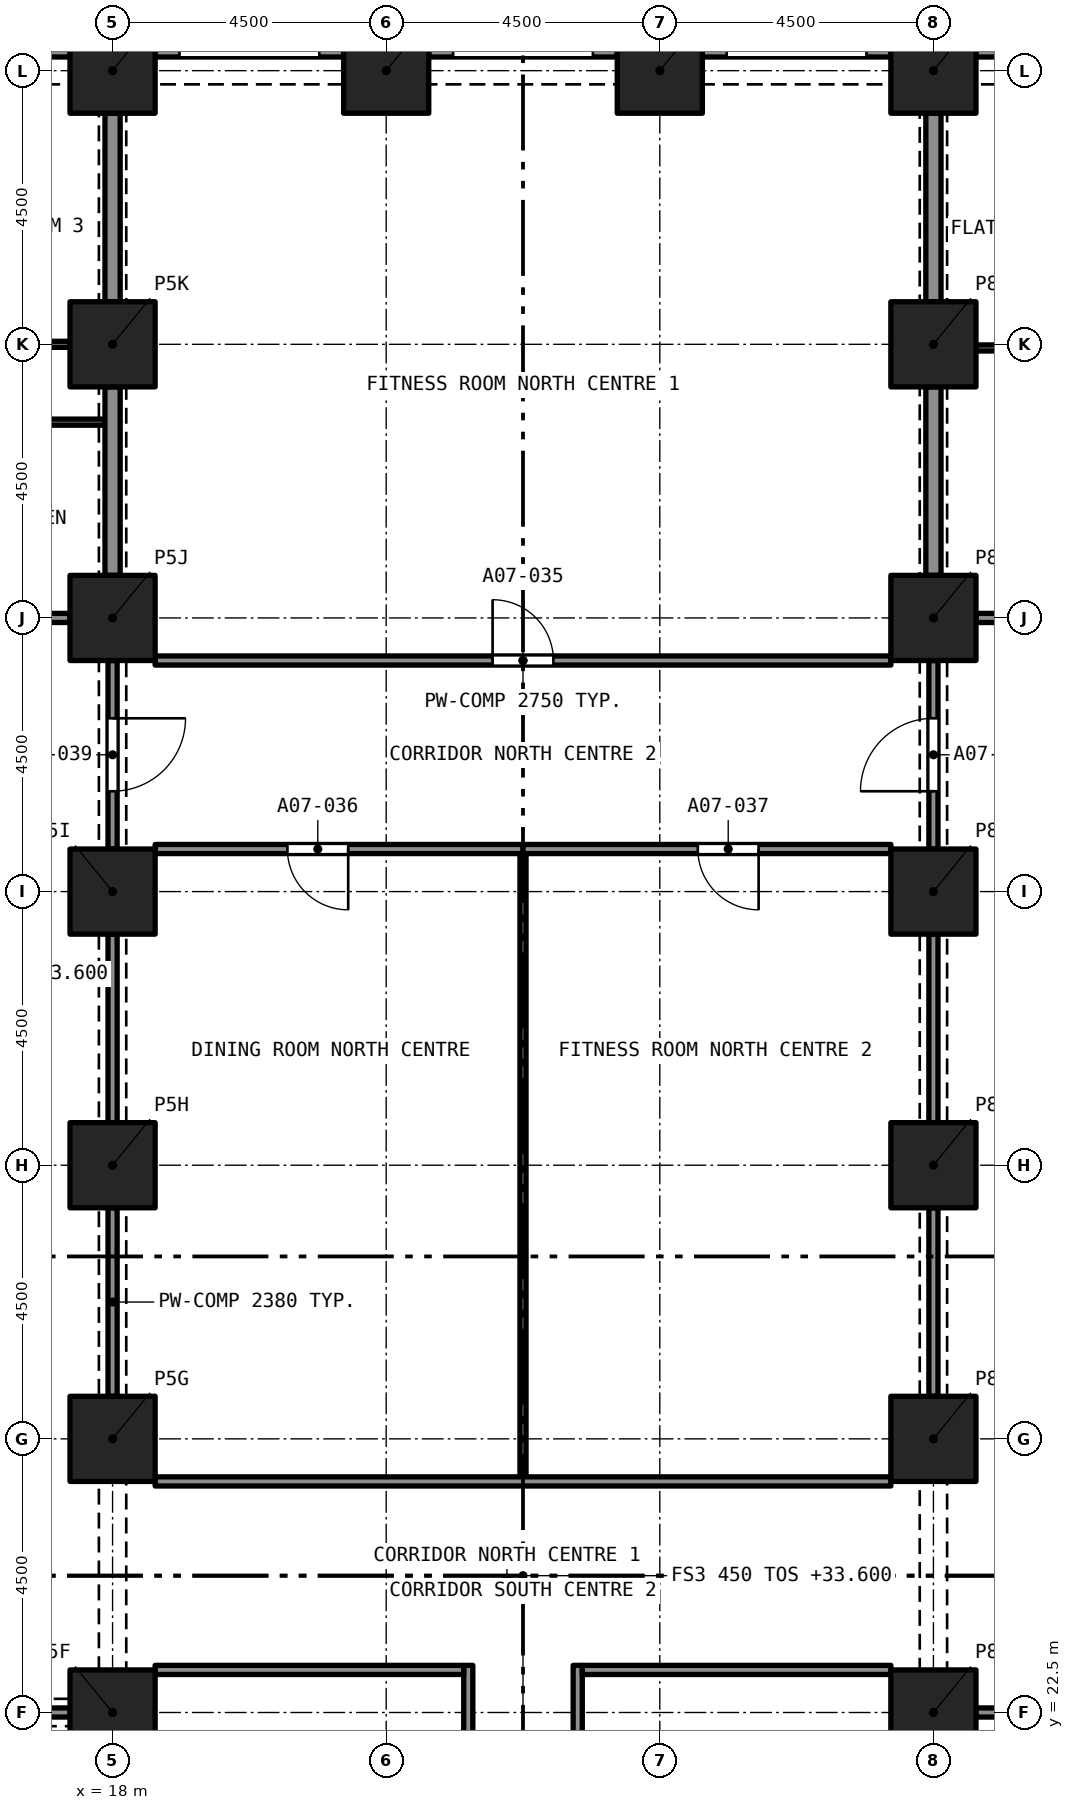
"""IFC4 building model, lengths in metres.
Left out: names, types, materials, properties, quantities, classifications, styles, units other than length and angle.
Written with IfcOpenShell. Run it as: python <this file> out.ifc"""

import sys

from ifc_helpers import new_model, si_unit, direction, frame, frame_2d, origin, origin_2d, place, context, subcontext, project, spatial, rectangle, extrude, element, fill, save


model = new_model("IFC4")
c1 = context("Model", 3, precision=1e-05, world=origin(), true_north=direction((0.0, 1.0)))
c2 = subcontext(c1, "Body", "Model", "MODEL_VIEW")
j1 = project(units=[si_unit("LENGTHUNIT", "METRE"), si_unit("PLANEANGLEUNIT", "RADIAN")], contexts=[c1])
p1 = place(None, origin())
s1 = spatial("IfcSite", under=j1, at=p1, CompositionType="ELEMENT")
p2 = place(p1, origin())
s2 = spatial("IfcBuilding", under=s1, at=p2, CompositionType="ELEMENT")
p3 = place(p2, frame((0.0, 0.0, 33.6)))
s3 = spatial("IfcBuildingStorey", under=s2, at=p3, CompositionType="ELEMENT", Elevation=33.6)
for number, where, z_axis, x_axis in (
    (1, (18.0, 22.5, 0.0), (0.0, 0.0, 1.0), (1.0, 0.0, 0.0)),
    (2, (31.5, 22.5, 0.0), (0.0, 0.0, 1.0), (1.0, 0.0, 0.0)),
    (3, (18.0, 27.0, 0.0), (0.0, 0.0, 1.0), (1.0, 0.0, 0.0)),
    (4, (31.5, 27.0, 0.0), (0.0, 0.0, 1.0), (1.0, 0.0, 0.0)),
    (5, (18.0, 31.5, 0.0), (0.0, 0.0, 1.0), (1.0, 0.0, 0.0)),
    (6, (31.5, 31.5, 0.0), (0.0, 0.0, 1.0), (1.0, 0.0, 0.0)),
    (7, (18.0, 36.0, 0.0), (0.0, 0.0, 1.0), (1.0, 0.0, 0.0)),
    (8, (31.5, 36.0, 0.0), (0.0, 0.0, 1.0), (1.0, 0.0, 0.0)),
    (9, (18.0, 40.5, 0.0), (0.0, 0.0, 1.0), (1.0, 0.0, 0.0)),
    (10, (31.5, 40.5, 0.0), (0.0, 0.0, 1.0), (1.0, 0.0, 0.0)),
    (11, (18.0, 45.0, 0.0), (0.0, 0.0, 1.0), (1.0, 0.0, 0.0)),
    (12, (31.5, 45.0, 0.0), (0.0, 0.0, 1.0), (1.0, 0.0, 0.0)),
    (13, (18.0, 49.5, 0.0), (0.0, 0.0, 1.0), (1.0, 0.0, 0.0)),
    (14, (22.5, 49.5, 0.0), (0.0, 0.0, 1.0), (1.0, 0.0, 0.0)),
    (15, (27.0, 49.5, 0.0), (0.0, 0.0, 1.0), (1.0, 0.0, 0.0)),
    (16, (31.5, 49.5, 0.0), (0.0, 0.0, 1.0), (1.0, 0.0, 0.0)),
):
    element("IfcColumn", number, at=place(p3, frame(where, z_axis=z_axis, x_axis=x_axis)), inside=s3, PredefinedType="COLUMN", context=c2, shape_type="SweptSolid", body=[
        extrude(rectangle(XDim=1.4, YDim=1.4, at=origin_2d()), origin(), (0.0, 0.0, 1.0), 3.2),
    ])
p4 = place(p3, frame((32.2, 49.875, 0.0), z_axis=(0.0, 0.0, 1.0), x_axis=(1.0, 0.0, 0.0)))
e17 = element("IfcWall", 17, at=p4, inside=s3, PredefinedType="SOLIDWALL", context=c2, shape_type="SweptSolid", body=[
    extrude(rectangle(XDim=3.1, YDim=0.3, at=frame_2d((1.55, 0.0))), origin(), (0.0, 0.0, 1.0), 3.2),
])
p5 = place(p4, frame((0.4, 0.0, 0.45)))
e18 = element("IfcOpeningElement", 18, at=p5, cuts=e17, PredefinedType="OPENING", context=c2, shape_type="SweptSolid", body=[
    extrude(rectangle(XDim=2.3, YDim=1.95, at=frame_2d((1.15, 0.975))), frame((0.0, 0.16, 0.0), z_axis=(0.0, -1.0, 0.0), x_axis=(1.0, 0.0, 0.0)), (0.0, 0.0, 1.0), 0.32),
])
p6 = place(p3, frame((27.7, 49.875, 0.0), z_axis=(0.0, 0.0, 1.0), x_axis=(1.0, 0.0, 0.0)))
e19 = element("IfcWall", 19, at=p6, inside=s3, PredefinedType="SOLIDWALL", context=c2, shape_type="SweptSolid", body=[
    extrude(rectangle(XDim=3.1, YDim=0.3, at=frame_2d((1.55, 0.0))), origin(), (0.0, 0.0, 1.0), 3.2),
])
p7 = place(p6, frame((0.4, 0.0, 0.45)))
e20 = element("IfcOpeningElement", 20, at=p7, cuts=e19, PredefinedType="OPENING", context=c2, shape_type="SweptSolid", body=[
    extrude(rectangle(XDim=2.3, YDim=1.95, at=frame_2d((1.15, 0.975))), frame((0.0, 0.16, 0.0), z_axis=(0.0, -1.0, 0.0), x_axis=(1.0, 0.0, 0.0)), (0.0, 0.0, 1.0), 0.32),
])
p8 = place(p3, frame((23.2, 49.875, 0.0), z_axis=(0.0, 0.0, 1.0), x_axis=(1.0, 0.0, 0.0)))
e21 = element("IfcWall", 21, at=p8, inside=s3, PredefinedType="SOLIDWALL", context=c2, shape_type="SweptSolid", body=[
    extrude(rectangle(XDim=3.1, YDim=0.3, at=frame_2d((1.55, 0.0))), origin(), (0.0, 0.0, 1.0), 3.2),
])
p9 = place(p8, frame((0.4, 0.0, 0.45)))
e22 = element("IfcOpeningElement", 22, at=p9, cuts=e21, PredefinedType="OPENING", context=c2, shape_type="SweptSolid", body=[
    extrude(rectangle(XDim=2.3, YDim=1.95, at=frame_2d((1.15, 0.975))), frame((0.0, 0.16, 0.0), z_axis=(0.0, -1.0, 0.0), x_axis=(1.0, 0.0, 0.0)), (0.0, 0.0, 1.0), 0.32),
])
p10 = place(p3, frame((18.7, 49.875, 0.0), z_axis=(0.0, 0.0, 1.0), x_axis=(1.0, 0.0, 0.0)))
e23 = element("IfcWall", 23, at=p10, inside=s3, PredefinedType="SOLIDWALL", context=c2, shape_type="SweptSolid", body=[
    extrude(rectangle(XDim=3.1, YDim=0.3, at=frame_2d((1.55, 0.0))), origin(), (0.0, 0.0, 1.0), 3.2),
])
p11 = place(p10, frame((0.4, 0.0, 0.45)))
e24 = element("IfcOpeningElement", 24, at=p11, cuts=e23, PredefinedType="OPENING", context=c2, shape_type="SweptSolid", body=[
    extrude(rectangle(XDim=2.3, YDim=1.95, at=frame_2d((1.15, 0.975))), frame((0.0, 0.16, 0.0), z_axis=(0.0, -1.0, 0.0), x_axis=(1.0, 0.0, 0.0)), (0.0, 0.0, 1.0), 0.32),
])
p12 = place(p3, frame((14.2, 49.875, 0.0), z_axis=(0.0, 0.0, 1.0), x_axis=(1.0, 0.0, 0.0)))
e25 = element("IfcWall", 25, at=p12, inside=s3, PredefinedType="SOLIDWALL", context=c2, shape_type="SweptSolid", body=[
    extrude(rectangle(XDim=3.1, YDim=0.3, at=frame_2d((1.55, 0.0))), origin(), (0.0, 0.0, 1.0), 3.2),
])
p13 = place(p12, frame((0.4, 0.0, 0.45)))
e26 = element("IfcOpeningElement", 26, at=p13, cuts=e25, PredefinedType="OPENING", context=c2, shape_type="SweptSolid", body=[
    extrude(rectangle(XDim=2.3, YDim=1.95, at=frame_2d((1.15, 0.975))), frame((0.0, 0.16, 0.0), z_axis=(0.0, -1.0, 0.0), x_axis=(1.0, 0.0, 0.0)), (0.0, 0.0, 1.0), 0.32),
])
p14 = place(p3, frame((13.5, 45.0, 0.0), z_axis=(0.0, 0.0, 1.0), x_axis=(1.0, 0.0, 0.0)))
e27 = element("IfcWall", 27, at=p14, inside=s3, PredefinedType="PARTITIONING", context=c2, shape_type="SweptSolid", body=[
    extrude(rectangle(XDim=3.8, YDim=0.1, at=frame_2d((1.9, 0.0))), origin(), (0.0, 0.0, 1.0), 2.9),
])
p15 = place(p14, frame((1.8, 0.0, 0.0)))
e28 = element("IfcOpeningElement", 28, at=p15, cuts=e27, PredefinedType="OPENING", context=c2, shape_type="SweptSolid", body=[
    extrude(rectangle(XDim=0.9, YDim=2.1, at=frame_2d((0.45, 1.05))), frame((0.0, 0.06, 0.0), z_axis=(0.0, -1.0, 0.0), x_axis=(1.0, 0.0, 0.0)), (0.0, 0.0, 1.0), 0.12),
])
p16 = place(p3, frame((18.0, 45.7, 0.0), z_axis=(0.0, 0.0, 1.0), x_axis=(0.0, 1.0, 0.0)))
e29 = element("IfcWall", 29, at=p16, inside=s3, PredefinedType="PARTITIONING", context=c2, shape_type="SweptSolid", body=[
    extrude(rectangle(XDim=3.1, YDim=0.25, at=frame_2d((1.55, 0.0))), origin(), (0.0, 0.0, 1.0), 2.38),
])
p17 = place(p3, frame((17.875, 43.72, 0.0), z_axis=(0.0, 0.0, 1.0), x_axis=(-1.0, 0.0, 0.0)))
e30 = element("IfcWall", 30, at=p17, inside=s3, PredefinedType="PARTITIONING", context=c2, shape_type="SweptSolid", body=[
    extrude(rectangle(XDim=6.147, YDim=0.1, at=frame_2d((3.073, 0.0))), origin(), (0.0, 0.0, 1.0), 2.9),
])
p18 = place(p17, frame((2.561, 0.0, 0.0)))
e31 = element("IfcOpeningElement", 31, at=p18, cuts=e30, PredefinedType="OPENING", context=c2, shape_type="SweptSolid", body=[
    extrude(rectangle(XDim=0.9, YDim=2.1, at=frame_2d((0.45, 1.05))), frame((0.0, 0.06, 0.0), z_axis=(0.0, -1.0, 0.0), x_axis=(1.0, 0.0, 0.0)), (0.0, 0.0, 1.0), 0.12),
])
p19 = place(p3, frame((18.0, 41.2, 0.0), z_axis=(0.0, 0.0, 1.0), x_axis=(0.0, 1.0, 0.0)))
e32 = element("IfcWall", 32, at=p19, inside=s3, PredefinedType="PARTITIONING", context=c2, shape_type="SweptSolid", body=[
    extrude(rectangle(XDim=3.1, YDim=0.25, at=frame_2d((1.55, 0.0))), origin(), (0.0, 0.0, 1.0), 2.38),
])
p20 = place(p3, frame((13.5, 40.5, 0.0), z_axis=(0.0, 0.0, 1.0), x_axis=(1.0, 0.0, 0.0)))
e33 = element("IfcWall", 33, at=p20, inside=s3, PredefinedType="PARTITIONING", context=c2, shape_type="SweptSolid", body=[
    extrude(rectangle(XDim=3.8, YDim=0.15, at=frame_2d((1.9, 0.0))), origin(), (0.0, 0.0, 1.0), 2.9),
])
p21 = place(p3, frame((32.2, 44.94, 0.0), z_axis=(0.0, 0.0, 1.0), x_axis=(1.0, 0.0, 0.0)))
e34 = element("IfcWall", 34, at=p21, inside=s3, PredefinedType="PARTITIONING", context=c2, shape_type="SweptSolid", body=[
    extrude(rectangle(XDim=3.8, YDim=0.1, at=frame_2d((1.9, 0.0))), origin(), (0.0, 0.0, 1.0), 2.9),
])
p22 = place(p21, frame((1.05, 0.0, 0.0)))
e35 = element("IfcOpeningElement", 35, at=p22, cuts=e34, PredefinedType="OPENING", context=c2, shape_type="SweptSolid", body=[
    extrude(rectangle(XDim=1.0, YDim=2.1, at=frame_2d((0.5, 1.05))), frame((0.0, 0.06, 0.0), z_axis=(0.0, -1.0, 0.0), x_axis=(1.0, 0.0, 0.0)), (0.0, 0.0, 1.0), 0.12),
])
p23 = place(p3, frame((31.5, 41.2, 0.0), z_axis=(0.0, 0.0, 1.0), x_axis=(0.0, 1.0, 0.0)))
e36 = element("IfcWall", 36, at=p23, inside=s3, PredefinedType="PARTITIONING", context=c2, shape_type="SweptSolid", body=[
    extrude(rectangle(XDim=3.1, YDim=0.25, at=frame_2d((1.55, 0.0))), origin(), (0.0, 0.0, 1.0), 2.38),
])
p24 = place(p3, frame((32.2, 40.5, 0.0), z_axis=(0.0, 0.0, 1.0), x_axis=(1.0, 0.0, 0.0)))
e37 = element("IfcWall", 37, at=p24, inside=s3, PredefinedType="PARTITIONING", context=c2, shape_type="SweptSolid", body=[
    extrude(rectangle(XDim=2.225, YDim=0.15, at=frame_2d((1.113, 0.0))), origin(), (0.0, 0.0, 1.0), 2.9),
])
p25 = place(p24, frame((1.05, 0.0, 0.0)))
e38 = element("IfcOpeningElement", 38, at=p25, cuts=e37, PredefinedType="OPENING", context=c2, shape_type="SweptSolid", body=[
    extrude(rectangle(XDim=1.0, YDim=2.1, at=frame_2d((0.5, 1.05))), frame((0.0, 0.085, 0.0), z_axis=(0.0, -1.0, 0.0), x_axis=(1.0, 0.0, 0.0)), (0.0, 0.0, 1.0), 0.17),
])
p26 = place(p3, frame((31.5, 45.7, 0.0), z_axis=(0.0, 0.0, 1.0), x_axis=(0.0, 1.0, 0.0)))
e39 = element("IfcWall", 39, at=p26, inside=s3, PredefinedType="PARTITIONING", context=c2, shape_type="SweptSolid", body=[
    extrude(rectangle(XDim=3.1, YDim=0.25, at=frame_2d((1.55, 0.0))), origin(), (0.0, 0.0, 1.0), 2.38),
])
p27 = place(p3, frame((18.7, 39.8, 0.0), z_axis=(0.0, 0.0, 1.0), x_axis=(1.0, 0.0, 0.0)))
e40 = element("IfcWall", 40, at=p27, inside=s3, PredefinedType="PARTITIONING", context=c2, shape_type="SweptSolid", body=[
    extrude(rectangle(XDim=12.1, YDim=0.15, at=frame_2d((6.05, 0.0))), origin(), (0.0, 0.0, 1.0), 2.75),
])
p28 = place(p27, frame((5.55, 0.0, 0.0)))
e41 = element("IfcOpeningElement", 41, at=p28, cuts=e40, PredefinedType="OPENING", context=c2, shape_type="SweptSolid", body=[
    extrude(rectangle(XDim=1.0, YDim=2.1, at=frame_2d((0.5, 1.05))), frame((0.0, 0.085, 0.0), z_axis=(0.0, -1.0, 0.0), x_axis=(1.0, 0.0, 0.0)), (0.0, 0.0, 1.0), 0.17),
])
p29 = place(p3, frame((24.75, 36.7, 0.0), z_axis=(0.0, 0.0, 1.0), x_axis=(-1.0, 0.0, 0.0)))
e42 = element("IfcWall", 42, at=p29, inside=s3, PredefinedType="PARTITIONING", context=c2, shape_type="SweptSolid", body=[
    extrude(rectangle(XDim=6.05, YDim=0.15, at=frame_2d((3.025, 0.0))), origin(), (0.0, 0.0, 1.0), 2.75),
])
p30 = place(p29, frame((2.875, 0.0, 0.0)))
e43 = element("IfcOpeningElement", 43, at=p30, cuts=e42, PredefinedType="OPENING", context=c2, shape_type="SweptSolid", body=[
    extrude(rectangle(XDim=1.0, YDim=2.1, at=frame_2d((0.5, 1.05))), frame((0.0, 0.085, 0.0), z_axis=(0.0, -1.0, 0.0), x_axis=(1.0, 0.0, 0.0)), (0.0, 0.0, 1.0), 0.17),
])
p31 = place(p3, frame((30.8, 36.7, 0.0), z_axis=(0.0, 0.0, 1.0), x_axis=(-1.0, 0.0, 0.0)))
e44 = element("IfcWall", 44, at=p31, inside=s3, PredefinedType="PARTITIONING", context=c2, shape_type="SweptSolid", body=[
    extrude(rectangle(XDim=6.05, YDim=0.15, at=frame_2d((3.025, 0.0))), origin(), (0.0, 0.0, 1.0), 2.75),
])
p32 = place(p31, frame((2.175, 0.0, 0.0)))
e45 = element("IfcOpeningElement", 45, at=p32, cuts=e44, PredefinedType="OPENING", context=c2, shape_type="SweptSolid", body=[
    extrude(rectangle(XDim=1.0, YDim=2.1, at=frame_2d((0.5, 1.05))), frame((0.0, 0.085, 0.0), z_axis=(0.0, -1.0, 0.0), x_axis=(1.0, 0.0, 0.0)), (0.0, 0.0, 1.0), 0.17),
])
p33 = place(p3, frame((31.5, 36.7, 0.0), z_axis=(0.0, 0.0, 1.0), x_axis=(0.0, 1.0, 0.0)))
e46 = element("IfcWall", 46, at=p33, inside=s3, PredefinedType="PARTITIONING", context=c2, shape_type="SweptSolid", body=[
    extrude(rectangle(XDim=3.1, YDim=0.15, at=frame_2d((1.55, 0.0))), origin(), (0.0, 0.0, 1.0), 2.38),
])
p34 = place(p33, frame((0.95, 0.0, 0.0)))
e47 = element("IfcOpeningElement", 47, at=p34, cuts=e46, PredefinedType="OPENING", context=c2, shape_type="SweptSolid", body=[
    extrude(rectangle(XDim=1.2, YDim=2.1, at=frame_2d((0.6, 1.05))), frame((0.0, 0.085, 0.0), z_axis=(0.0, -1.0, 0.0), x_axis=(1.0, 0.0, 0.0)), (0.0, 0.0, 1.0), 0.17),
])
p35 = place(p3, frame((18.0, 39.8, 0.0), z_axis=(0.0, 0.0, 1.0), x_axis=(0.0, -1.0, 0.0)))
e48 = element("IfcWall", 48, at=p35, inside=s3, PredefinedType="PARTITIONING", context=c2, shape_type="SweptSolid", body=[
    extrude(rectangle(XDim=3.1, YDim=0.15, at=frame_2d((1.55, 0.0))), origin(), (0.0, 0.0, 1.0), 2.38),
])
p36 = place(p35, frame((0.95, 0.0, 0.0)))
e49 = element("IfcOpeningElement", 49, at=p36, cuts=e48, PredefinedType="OPENING", context=c2, shape_type="SweptSolid", body=[
    extrude(rectangle(XDim=1.2, YDim=2.1, at=frame_2d((0.6, 1.05))), frame((0.0, 0.085, 0.0), z_axis=(0.0, -1.0, 0.0), x_axis=(1.0, 0.0, 0.0)), (0.0, 0.0, 1.0), 0.17),
])
p37 = place(p3, frame((23.85, 17.225, 0.0), z_axis=(0.0, 0.0, 1.0), x_axis=(0.0, 1.0, 0.0)))
e50 = element("IfcWall", 50, at=p37, inside=s3, PredefinedType="PARTITIONING", context=c2, shape_type="SweptSolid", body=[
    extrude(rectangle(XDim=6.05, YDim=0.15, at=frame_2d((3.025, 0.0))), origin(), (0.0, 0.0, 1.0), 2.75),
])
p38 = place(p37, frame((2.525, 0.0, 0.0)))
e51 = element("IfcOpeningElement", 51, at=p38, cuts=e50, PredefinedType="OPENING", context=c2, shape_type="SweptSolid", body=[
    extrude(rectangle(XDim=1.0, YDim=2.1, at=frame_2d((0.5, 1.05))), frame((0.0, 0.085, 0.0), z_axis=(0.0, -1.0, 0.0), x_axis=(1.0, 0.0, 0.0)), (0.0, 0.0, 1.0), 0.17),
])
p39 = place(p3, frame((25.65, 23.275, 0.0), z_axis=(0.0, 0.0, 1.0), x_axis=(0.0, -1.0, 0.0)))
e52 = element("IfcWall", 52, at=p39, inside=s3, PredefinedType="PARTITIONING", context=c2, shape_type="SweptSolid", body=[
    extrude(rectangle(XDim=6.05, YDim=0.15, at=frame_2d((3.025, 0.0))), origin(), (0.0, 0.0, 1.0), 2.75),
])
p40 = place(p39, frame((2.525, 0.0, 0.0)))
e53 = element("IfcOpeningElement", 53, at=p40, cuts=e52, PredefinedType="OPENING", context=c2, shape_type="SweptSolid", body=[
    extrude(rectangle(XDim=1.0, YDim=2.1, at=frame_2d((0.5, 1.05))), frame((0.0, 0.085, 0.0), z_axis=(0.0, -1.0, 0.0), x_axis=(1.0, 0.0, 0.0)), (0.0, 0.0, 1.0), 0.17),
])
p41 = place(p3, frame((24.75, 26.375, 0.0), z_axis=(0.0, 0.0, 1.0), x_axis=(0.0, 1.0, 0.0)))
e54 = element("IfcWall", 54, at=p41, inside=s3, PredefinedType="PARTITIONING", context=c2, shape_type="SweptSolid", body=[
    extrude(rectangle(XDim=10.25, YDim=0.1, at=frame_2d((5.125, 0.0))), origin(), (0.0, 0.0, 1.0), 2.75),
])
for number, where, z_axis, x_axis in (
    (55, (18.0, 27.7, 0.0), (0.0, 0.0, 1.0), (0.0, 1.0, 0.0)),
    (56, (18.0, 32.2, 0.0), (0.0, 0.0, 1.0), (0.0, 1.0, 0.0)),
):
    element("IfcWall", number, at=place(p3, frame(where, z_axis=z_axis, x_axis=x_axis)), inside=s3, PredefinedType="PARTITIONING", context=c2, shape_type="SweptSolid", body=[
        extrude(rectangle(XDim=3.1, YDim=0.15, at=frame_2d((1.55, 0.0))), origin(), (0.0, 0.0, 1.0), 2.38),
    ])
p42 = place(p3, frame((18.7, 26.3, 0.0), z_axis=(0.0, 0.0, 1.0), x_axis=(1.0, 0.0, 0.0)))
e57 = element("IfcWall", 57, at=p42, inside=s3, PredefinedType="PARTITIONING", context=c2, shape_type="SweptSolid", body=[
    extrude(rectangle(XDim=12.1, YDim=0.15, at=frame_2d((6.05, 0.0))), origin(), (0.0, 0.0, 1.0), 2.75),
])
for number, where, z_axis, x_axis in (
    (58, (31.5, 32.2, 0.0), (0.0, 0.0, 1.0), (0.0, 1.0, 0.0)),
    (59, (31.5, 27.7, 0.0), (0.0, 0.0, 1.0), (0.0, 1.0, 0.0)),
):
    element("IfcWall", number, at=place(p3, frame(where, z_axis=z_axis, x_axis=x_axis)), inside=s3, PredefinedType="PARTITIONING", context=c2, shape_type="SweptSolid", body=[
        extrude(rectangle(XDim=3.1, YDim=0.15, at=frame_2d((1.55, 0.0))), origin(), (0.0, 0.0, 1.0), 2.38),
    ])
for number, where, z_axis, x_axis in (
    (60, (18.7, 23.2, 0.0), (0.0, 0.0, 1.0), (1.0, 0.0, 0.0)),
    (61, (25.725, 23.2, 0.0), (0.0, 0.0, 1.0), (1.0, 0.0, 0.0)),
):
    element("IfcWall", number, at=place(p3, frame(where, z_axis=z_axis, x_axis=x_axis)), inside=s3, PredefinedType="PARTITIONING", context=c2, shape_type="SweptSolid", body=[
        extrude(rectangle(XDim=5.075, YDim=0.15, at=frame_2d((2.538, 0.0))), origin(), (0.0, 0.0, 1.0), 2.75),
    ])
p43 = place(p3, frame((32.2, 22.5, 0.0), z_axis=(0.0, 0.0, 1.0), x_axis=(1.0, 0.0, 0.0)))
e62 = element("IfcWall", 62, at=p43, inside=s3, PredefinedType="PARTITIONING", context=c2, shape_type="SweptSolid", body=[
    extrude(rectangle(XDim=9.725, YDim=0.15, at=frame_2d((4.863, 0.0))), origin(), (0.0, 0.0, 1.0), 2.9),
])
p44 = place(p3, frame((14.2, 22.5, 0.0), z_axis=(0.0, 0.0, 1.0), x_axis=(1.0, 0.0, 0.0)))
e63 = element("IfcWall", 63, at=p44, inside=s3, PredefinedType="PARTITIONING", context=c2, shape_type="SweptSolid", body=[
    extrude(rectangle(XDim=3.1, YDim=0.15, at=frame_2d((1.55, 0.0))), origin(), (0.0, 0.0, 1.0), 2.38),
])
p45 = place(p28, origin())
e64 = element("IfcDoor", 64, at=p45, inside=s3, OperationType="SINGLE_SWING_RIGHT", PredefinedType="DOOR", context=c2, shape_type="SweptSolid", body=[
    extrude(rectangle(XDim=1.0, YDim=2.1, at=frame_2d((0.5, 1.05))), frame((0.0, 0.025, 0.0), z_axis=(0.0, -1.0, 0.0), x_axis=(1.0, 0.0, 0.0)), (0.0, 0.0, 1.0), 0.05),
])
fill(e41, e64)
p46 = place(p30, origin())
e65 = element("IfcDoor", 65, at=p46, inside=s3, OperationType="SINGLE_SWING_RIGHT", PredefinedType="DOOR", context=c2, shape_type="SweptSolid", body=[
    extrude(rectangle(XDim=1.0, YDim=2.1, at=frame_2d((0.5, 1.05))), frame((0.0, 0.025, 0.0), z_axis=(0.0, -1.0, 0.0), x_axis=(1.0, 0.0, 0.0)), (0.0, 0.0, 1.0), 0.05),
])
fill(e43, e65)
p47 = place(p32, origin())
e66 = element("IfcDoor", 66, at=p47, inside=s3, OperationType="SINGLE_SWING_LEFT", PredefinedType="DOOR", context=c2, shape_type="SweptSolid", body=[
    extrude(rectangle(XDim=1.0, YDim=2.1, at=frame_2d((0.5, 1.05))), frame((0.0, 0.025, 0.0), z_axis=(0.0, -1.0, 0.0), x_axis=(1.0, 0.0, 0.0)), (0.0, 0.0, 1.0), 0.05),
])
fill(e45, e66)
p48 = place(p34, origin())
e67 = element("IfcDoor", 67, at=p48, inside=s3, OperationType="SINGLE_SWING_LEFT", PredefinedType="DOOR", context=c2, shape_type="SweptSolid", body=[
    extrude(rectangle(XDim=1.2, YDim=2.1, at=frame_2d((0.6, 1.05))), frame((0.0, 0.025, 0.0), z_axis=(0.0, -1.0, 0.0), x_axis=(1.0, 0.0, 0.0)), (0.0, 0.0, 1.0), 0.05),
])
fill(e47, e67)
p49 = place(p36, origin())
e68 = element("IfcDoor", 68, at=p49, inside=s3, OperationType="SINGLE_SWING_LEFT", PredefinedType="DOOR", context=c2, shape_type="SweptSolid", body=[
    extrude(rectangle(XDim=1.2, YDim=2.1, at=frame_2d((0.6, 1.05))), frame((0.0, 0.025, 0.0), z_axis=(0.0, -1.0, 0.0), x_axis=(1.0, 0.0, 0.0)), (0.0, 0.0, 1.0), 0.05),
])
fill(e49, e68)
save(model, sys.argv[1])
